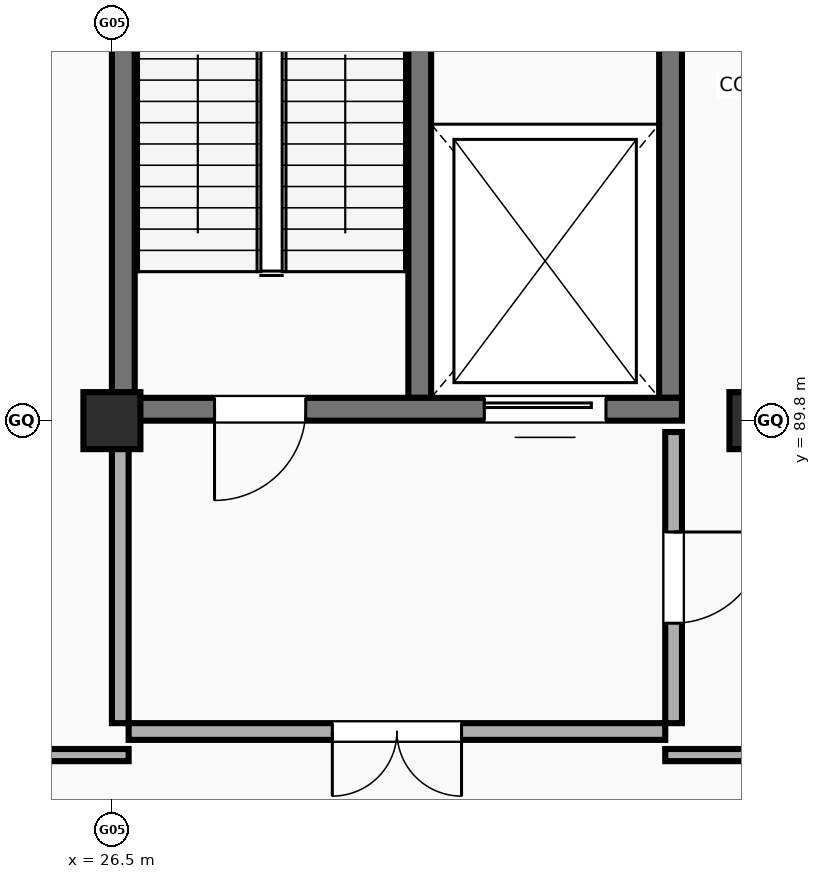
"""IFC4 building model, lengths in metres.
Left out: names, types, materials, properties, quantities, classifications, styles, units other than length and angle.
Written with IfcOpenShell. Run it as: python <this file> out.ifc"""

import sys

from ifc_helpers import new_model, si_unit, direction, frame, frame_2d, origin, origin_2d, place, context, subcontext, project, spatial, rectangle, extrude, element, fill, save


model = new_model("IFC4")
c1 = context("Model", 3, precision=1e-05, world=origin(), true_north=direction((0.0, 1.0)))
c2 = subcontext(c1, "Body", "Model", "MODEL_VIEW")
j1 = project(units=[si_unit("LENGTHUNIT", "METRE"), si_unit("PLANEANGLEUNIT", "RADIAN")], contexts=[c1])
p1 = place(None, origin())
s1 = spatial("IfcSite", under=j1, at=p1, CompositionType="ELEMENT")
p2 = place(p1, origin())
s2 = spatial("IfcBuilding", under=s1, at=p2, CompositionType="ELEMENT")
p3 = place(p2, frame((0.0, 0.0, 9.8)))
s3 = spatial("IfcBuildingStorey", under=s2, at=p3, CompositionType="ELEMENT", Elevation=9.8)
for number, where, z_axis, x_axis in (
    (1, (26.5, 89.8, 0.0), (0.0, 0.0, 1.0), (1.0, 0.0, 0.0)),
    (2, (35.0, 89.8, 0.0), (0.0, 0.0, 1.0), (1.0, 0.0, 0.0)),
):
    element("IfcColumn", number, at=place(p3, frame(where, z_axis=z_axis, x_axis=x_axis)), inside=s3, PredefinedType="COLUMN", context=c2, shape_type="SweptSolid", body=[
        extrude(rectangle(XDim=0.75, YDim=0.75, at=origin_2d()), origin(), (0.0, 0.0, 1.0), 4.4),
    ])
for number, where, z_axis, x_axis in (
    (3, (26.65, 90.1, 0.0), (0.0, 0.0, 1.0), (0.0, 1.0, 0.0)),
    (4, (33.85, 90.1, 0.0), (0.0, 0.0, 1.0), (0.0, 1.0, 0.0)),
    (5, (30.55, 90.1, 0.0), (0.0, 0.0, 1.0), (0.0, 1.0, 0.0)),
):
    element("IfcWall", number, at=place(p3, frame(where, z_axis=z_axis, x_axis=x_axis)), inside=s3, PredefinedType="SHEAR", context=c2, shape_type="SweptSolid", body=[
        extrude(rectangle(XDim=8.2, YDim=0.3, at=frame_2d((4.1, 0.0))), origin(), (0.0, 0.0, 1.0), 4.4),
    ])
p4 = place(p3, frame((26.5, 89.95, 0.0), z_axis=(0.0, 0.0, 1.0), x_axis=(1.0, 0.0, 0.0)))
e6 = element("IfcWall", 6, at=p4, inside=s3, PredefinedType="SHEAR", context=c2, shape_type="SweptSolid", body=[
    extrude(rectangle(XDim=7.5, YDim=0.3, at=frame_2d((3.75, 0.0))), origin(), (0.0, 0.0, 1.0), 4.4),
])
p5 = place(p4, frame((2.55, 0.0, 0.0), z_axis=(0.0, 0.0, 1.0), x_axis=(-1.0, 0.0, 0.0)))
e7 = element("IfcOpeningElement", 7, at=p5, cuts=e6, PredefinedType="OPENING", context=c2, shape_type="SweptSolid", body=[
    extrude(rectangle(XDim=1.2, YDim=2.15, at=frame_2d((0.6, 1.075))), frame((0.0, 0.16, 0.0), z_axis=(0.0, -1.0, 0.0), x_axis=(1.0, 0.0, 0.0)), (0.0, 0.0, 1.0), 0.32),
])
p6 = place(p4, frame((4.9, 0.0, 0.0)))
e8 = element("IfcOpeningElement", 8, at=p6, cuts=e6, PredefinedType="OPENING", context=c2, shape_type="SweptSolid", body=[
    extrude(rectangle(XDim=1.6, YDim=2.25, at=frame_2d((0.8, 1.125))), frame((0.0, 0.16, 0.0), z_axis=(0.0, -1.0, 0.0), x_axis=(1.0, 0.0, 0.0)), (0.0, 0.0, 1.0), 0.32),
])
p7 = place(p3, frame((26.72, 85.71, 0.0), z_axis=(0.0, 0.0, 1.0), x_axis=(1.0, 0.0, 0.0)))
e9 = element("IfcWall", 9, at=p7, inside=s3, PredefinedType="SOLIDWALL", context=c2, shape_type="SweptSolid", body=[
    extrude(rectangle(XDim=7.06, YDim=0.22, at=frame_2d((3.53, 0.0))), origin(), (0.0, 0.0, 1.0), 3.3),
])
p8 = place(p7, frame((4.38, 0.0, 0.0), z_axis=(0.0, 0.0, 1.0), x_axis=(-1.0, 0.0, 0.0)))
e10 = element("IfcOpeningElement", 10, at=p8, cuts=e9, PredefinedType="OPENING", context=c2, shape_type="SweptSolid", body=[
    extrude(rectangle(XDim=1.7, YDim=2.18, at=frame_2d((0.85, 1.09))), frame((0.0, 0.12, 0.0), z_axis=(0.0, -1.0, 0.0), x_axis=(1.0, 0.0, 0.0)), (0.0, 0.0, 1.0), 0.24),
])
p9 = place(p3, frame((26.61, 85.82, 0.0), z_axis=(0.0, 0.0, 1.0), x_axis=(0.0, 1.0, 0.0)))
e11 = element("IfcWall", 11, at=p9, inside=s3, PredefinedType="SOLIDWALL", context=c2, shape_type="SweptSolid", body=[
    extrude(rectangle(XDim=3.83, YDim=0.22, at=frame_2d((1.915, 0.0))), origin(), (0.0, 0.0, 1.0), 3.3),
])
p10 = place(p3, frame((33.89, 85.82, 0.0), z_axis=(0.0, 0.0, 1.0), x_axis=(0.0, 1.0, 0.0)))
e12 = element("IfcWall", 12, at=p10, inside=s3, PredefinedType="SOLIDWALL", context=c2, shape_type="SweptSolid", body=[
    extrude(rectangle(XDim=3.83, YDim=0.22, at=frame_2d((1.915, 0.0))), origin(), (0.0, 0.0, 1.0), 3.3),
])
p11 = place(p10, frame((2.515, 0.0, 0.0), z_axis=(0.0, 0.0, 1.0), x_axis=(-1.0, 0.0, 0.0)))
e13 = element("IfcOpeningElement", 13, at=p11, cuts=e12, PredefinedType="OPENING", context=c2, shape_type="SweptSolid", body=[
    extrude(rectangle(XDim=1.2, YDim=2.15, at=frame_2d((0.6, 1.075))), frame((0.0, 0.12, 0.0), z_axis=(0.0, -1.0, 0.0), x_axis=(1.0, 0.0, 0.0)), (0.0, 0.0, 1.0), 0.24),
])
p12 = place(p3, frame((19.4, 85.4, 0.0), z_axis=(0.0, 0.0, 1.0), x_axis=(1.0, 0.0, 0.0)))
e14 = element("IfcWall", 14, at=p12, inside=s3, PredefinedType="PARTITIONING", context=c2, shape_type="SweptSolid", body=[
    extrude(rectangle(XDim=7.32, YDim=0.16, at=frame_2d((3.66, 0.0))), origin(), (0.0, 0.0, 1.0), 3.3),
])
p13 = place(p3, frame((33.78, 85.4, 0.0), z_axis=(0.0, 0.0, 1.0), x_axis=(1.0, 0.0, 0.0)))
e15 = element("IfcWall", 15, at=p13, inside=s3, PredefinedType="PARTITIONING", context=c2, shape_type="SweptSolid", body=[
    extrude(rectangle(XDim=5.42, YDim=0.16, at=frame_2d((2.71, 0.0))), origin(), (0.0, 0.0, 1.0), 3.3),
])
p14 = place(p5, origin())
e16 = element("IfcDoor", 16, at=p14, inside=s3, OperationType="SINGLE_SWING_RIGHT", PredefinedType="DOOR", context=c2, shape_type="SweptSolid", body=[
    extrude(rectangle(XDim=1.2, YDim=2.15, at=frame_2d((0.6, 1.075))), frame((0.0, 0.025, 0.0), z_axis=(0.0, -1.0, 0.0), x_axis=(1.0, 0.0, 0.0)), (0.0, 0.0, 1.0), 0.05),
])
fill(e7, e16)
p15 = place(p6, origin())
e17 = element("IfcDoor", 17, at=p15, inside=s3, OperationType="SLIDING_TO_LEFT", PredefinedType="DOOR", context=c2, shape_type="SweptSolid", body=[
    extrude(rectangle(XDim=1.6, YDim=2.25, at=frame_2d((0.8, 1.125))), frame((0.0, 0.025, 0.0), z_axis=(0.0, -1.0, 0.0), x_axis=(1.0, 0.0, 0.0)), (0.0, 0.0, 1.0), 0.05),
])
fill(e8, e17)
p16 = place(p8, origin())
e18 = element("IfcDoor", 18, at=p16, inside=s3, OperationType="DOUBLE_DOOR_SINGLE_SWING", PredefinedType="DOOR", context=c2, shape_type="SweptSolid", body=[
    extrude(rectangle(XDim=1.7, YDim=2.18, at=frame_2d((0.85, 1.09))), frame((0.0, 0.025, 0.0), z_axis=(0.0, -1.0, 0.0), x_axis=(1.0, 0.0, 0.0)), (0.0, 0.0, 1.0), 0.05),
])
fill(e10, e18)
p17 = place(p11, origin())
e19 = element("IfcDoor", 19, at=p17, inside=s3, OperationType="SINGLE_SWING_LEFT", PredefinedType="DOOR", context=c2, shape_type="SweptSolid", body=[
    extrude(rectangle(XDim=1.2, YDim=2.15, at=frame_2d((0.6, 1.075))), frame((0.0, 0.025, 0.0), z_axis=(0.0, -1.0, 0.0), x_axis=(1.0, 0.0, 0.0)), (0.0, 0.0, 1.0), 0.05),
])
fill(e13, e19)
save(model, sys.argv[1])
